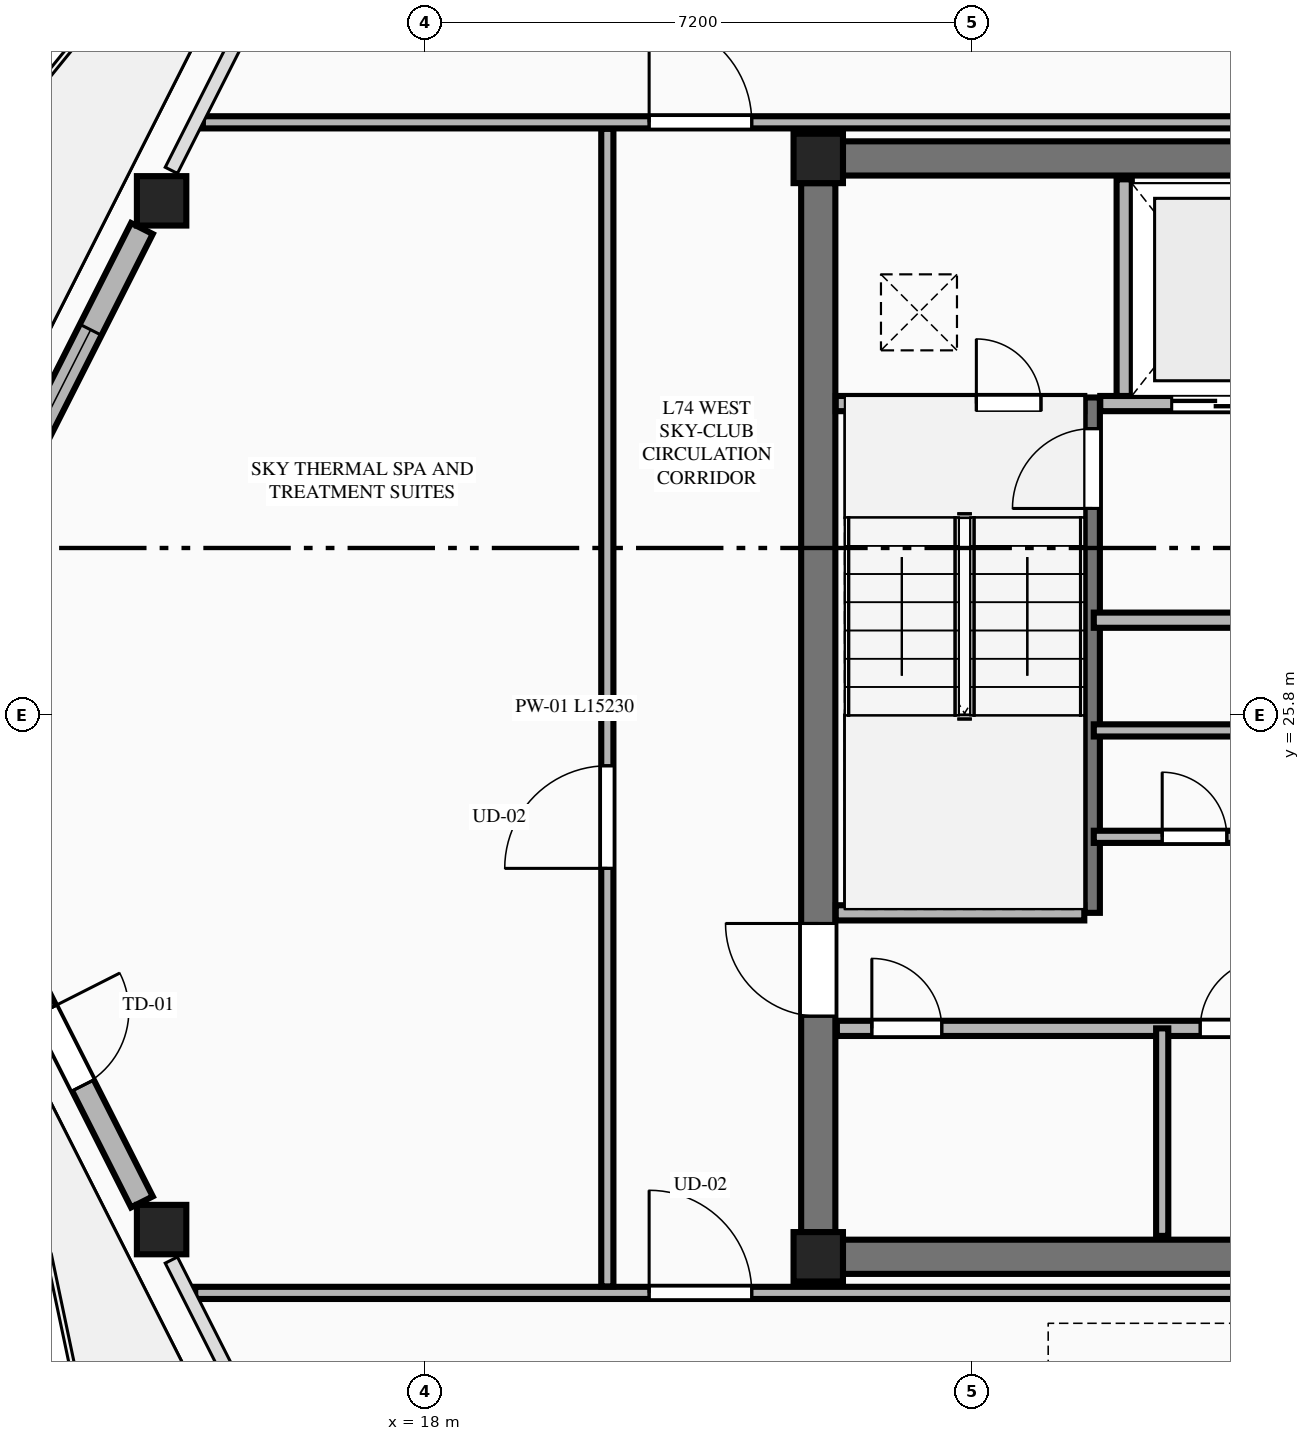
"""IFC4 building model, lengths in metres.
Left out: names, types, materials, properties, quantities, classifications, styles, units other than length and angle.
Written with IfcOpenShell. Run it as: python <this file> out.ifc"""

import sys

from ifc_helpers import new_model, si_unit, direction, frame, frame_2d, origin, origin_2d, place, context, subcontext, project, spatial, rectangle, extrude, element, fill, save


model = new_model("IFC4")
c1 = context("Model", 3, precision=1e-05, world=origin(), true_north=direction((0.0, 1.0)))
c2 = subcontext(c1, "Body", "Model", "MODEL_VIEW")
j1 = project(units=[si_unit("LENGTHUNIT", "METRE"), si_unit("PLANEANGLEUNIT", "RADIAN")], contexts=[c1])
p1 = place(None, origin())
s1 = spatial("IfcSite", under=j1, at=p1, CompositionType="ELEMENT")
p2 = place(p1, origin())
s2 = spatial("IfcBuilding", under=s1, at=p2, CompositionType="ELEMENT")
p3 = place(p2, frame((0.0, 0.0, 278.1)))
s3 = spatial("IfcBuildingStorey", under=s2, at=p3, CompositionType="ELEMENT", Elevation=278.1)
for number, where, z_axis, x_axis in (
    (1, (23.175, 18.675, 0.0), (0.0, 0.0, 1.0), (1.0, 0.0, 0.0)),
    (2, (23.175, 33.125, 0.0), (0.0, 0.0, 1.0), (1.0, 0.0, 0.0)),
):
    element("IfcColumn", number, at=place(p3, frame(where, z_axis=z_axis, x_axis=x_axis)), inside=s3, PredefinedType="COLUMN", context=c2, shape_type="SweptSolid", body=[
        extrude(rectangle(XDim=0.65, YDim=0.65, at=origin_2d()), origin(), (0.0, 0.0, 1.0), 5.4),
    ])
for number, where, z_axis, x_axis in (
    (3, (23.5, 18.675, 0.0), (0.0, 0.0, 1.0), (1.0, 0.0, 0.0)),
    (4, (23.5, 33.125, 0.0), (0.0, 0.0, 1.0), (1.0, 0.0, 0.0)),
):
    element("IfcWall", number, at=place(p3, frame(where, z_axis=z_axis, x_axis=x_axis)), inside=s3, PredefinedType="SHEAR", context=c2, shape_type="SweptSolid", body=[
        extrude(rectangle(XDim=17.8, YDim=0.45, at=frame_2d((8.9, 0.0))), origin(), (0.0, 0.0, 1.0), 5.2),
    ])
p4 = place(p3, frame((23.175, 19.0, 0.0), z_axis=(0.0, 0.0, 1.0), x_axis=(0.0, 1.0, 0.0)))
e5 = element("IfcWall", 5, at=p4, inside=s3, PredefinedType="SHEAR", context=c2, shape_type="SweptSolid", body=[
    extrude(rectangle(XDim=13.8, YDim=0.45, at=frame_2d((6.9, 0.0))), origin(), (0.0, 0.0, 1.0), 5.2),
])
p5 = place(p4, frame((2.84, 0.0, 0.0)))
e6 = element("IfcOpeningElement", 6, at=p5, cuts=e5, PredefinedType="OPENING", context=c2, shape_type="SweptSolid", body=[
    extrude(rectangle(XDim=1.22, YDim=2.25, at=frame_2d((0.61, 1.125))), frame((0.0, 0.235, 0.0), z_axis=(0.0, -1.0, 0.0), x_axis=(1.0, 0.0, 0.0)), (0.0, 0.0, 1.0), 0.47),
])
for number, where, z_axis, x_axis in (
    (7, (14.536, 32.567, 0.0), (0.0, 0.0, 1.0), (1.0, 0.0, 0.0)),
    (8, (14.536, 19.033, 0.0), (0.0, 0.0, 1.0), (1.0, 0.0, 0.0)),
):
    element("IfcColumn", number, at=place(p3, frame(where, z_axis=z_axis, x_axis=x_axis)), inside=s3, PredefinedType="COLUMN", context=c2, shape_type="SweptSolid", body=[
        extrude(rectangle(XDim=0.65, YDim=0.65, at=origin_2d()), origin(), (0.0, 0.0, 1.0), 5.4),
    ])
p6 = place(p3, frame((26.78, 23.2, 0.0), z_axis=(0.0, 0.0, 1.0), x_axis=(0.0, 1.0, 0.0)))
e9 = element("IfcWall", 9, at=p6, inside=s3, PredefinedType="SHEAR", context=c2, shape_type="SweptSolid", body=[
    extrude(rectangle(XDim=6.78, YDim=0.2, at=frame_2d((3.39, 0.0))), origin(), (0.0, 0.0, 1.0), 5.4),
])
p7 = place(p6, frame((5.32, 0.0, 0.0)))
e10 = element("IfcOpeningElement", 10, at=p7, cuts=e9, PredefinedType="OPENING", context=c2, shape_type="SweptSolid", body=[
    extrude(rectangle(XDim=1.05, YDim=2.15, at=frame_2d((0.525, 1.075))), frame((0.0, 0.11, 0.0), z_axis=(0.0, -1.0, 0.0), x_axis=(1.0, 0.0, 0.0)), (0.0, 0.0, 1.0), 0.22),
])
p8 = place(p3, frame((23.405, 23.2, 0.0), z_axis=(0.0, 0.0, 1.0), x_axis=(1.0, 0.0, 0.0)))
e11 = element("IfcWall", 11, at=p8, inside=s3, PredefinedType="PLUMBINGWALL", context=c2, shape_type="SweptSolid", body=[
    extrude(rectangle(XDim=3.27, YDim=0.2, at=frame_2d((1.635, 0.0))), origin(), (0.0, 0.0, 1.0), 5.2),
])
p9 = place(p3, frame((23.405, 29.9, 0.0), z_axis=(0.0, 0.0, 1.0), x_axis=(1.0, 0.0, 0.0)))
e12 = element("IfcWall", 12, at=p9, inside=s3, PredefinedType="PLUMBINGWALL", context=c2, shape_type="SweptSolid", body=[
    extrude(rectangle(XDim=3.27, YDim=0.2, at=frame_2d((1.635, 0.0))), origin(), (0.0, 0.0, 1.0), 5.2),
])
p10 = place(p9, frame((1.85, 0.0, 0.0)))
e13 = element("IfcOpeningElement", 13, at=p10, cuts=e12, PredefinedType="OPENING", context=c2, shape_type="SweptSolid", body=[
    extrude(rectangle(XDim=0.85, YDim=2.05, at=frame_2d((0.425, 1.025))), frame((0.0, 0.11, 0.0), z_axis=(0.0, -1.0, 0.0), x_axis=(1.0, 0.0, 0.0)), (0.0, 0.0, 1.0), 0.22),
])
p11 = place(p3, frame((26.885, 29.9, 0.0), z_axis=(0.0, 0.0, 1.0), x_axis=(1.0, 0.0, 0.0)))
e14 = element("IfcWall", 14, at=p11, inside=s3, PredefinedType="PLUMBINGWALL", context=c2, shape_type="SweptSolid", body=[
    extrude(rectangle(XDim=3.015, YDim=0.2, at=frame_2d((1.507, 0.0))), origin(), (0.0, 0.0, 1.0), 5.2),
])
p12 = place(p11, frame((0.94, 0.0, 0.0)))
e15 = element("IfcOpeningElement", 15, at=p12, cuts=e14, PredefinedType="OPENING", context=c2, shape_type="SweptSolid", body=[
    extrude(rectangle(XDim=1.15, YDim=2.2, at=frame_2d((0.575, 1.1))), frame((0.0, 0.11, 0.0), z_axis=(0.0, -1.0, 0.0), x_axis=(1.0, 0.0, 0.0)), (0.0, 0.0, 1.0), 0.22),
])
p13 = place(p3, frame((27.2, 30.0, 0.0), z_axis=(0.0, 0.0, 1.0), x_axis=(0.0, 1.0, 0.0)))
e16 = element("IfcWall", 16, at=p13, inside=s3, PredefinedType="PLUMBINGWALL", context=c2, shape_type="SweptSolid", body=[
    extrude(rectangle(XDim=2.85, YDim=0.2, at=frame_2d((1.425, 0.0))), origin(), (0.0, 0.0, 1.0), 5.2),
])
p14 = place(p3, frame((26.8, 27.05, 0.0), z_axis=(0.0, 0.0, 1.0), x_axis=(1.0, 0.0, 0.0)))
e17 = element("IfcWall", 17, at=p14, inside=s3, PredefinedType="PLUMBINGWALL", context=c2, shape_type="SweptSolid", body=[
    extrude(rectangle(XDim=3.2, YDim=0.2, at=frame_2d((1.6, 0.0))), origin(), (0.0, 0.0, 1.0), 5.2),
])
p15 = place(p3, frame((26.8, 24.2, 0.0), z_axis=(0.0, 0.0, 1.0), x_axis=(1.0, 0.0, 0.0)))
e18 = element("IfcWall", 18, at=p15, inside=s3, PredefinedType="PARTITIONING", context=c2, shape_type="SweptSolid", body=[
    extrude(rectangle(XDim=3.2, YDim=0.16, at=frame_2d((1.6, 0.0))), origin(), (0.0, 0.0, 1.0), 5.2),
])
p16 = place(p15, frame((0.9, 0.0, 0.0)))
e19 = element("IfcOpeningElement", 19, at=p16, cuts=e18, PredefinedType="OPENING", context=c2, shape_type="SweptSolid", body=[
    extrude(rectangle(XDim=0.85, YDim=2.05, at=frame_2d((0.425, 1.025))), frame((0.0, 0.09, 0.0), z_axis=(0.0, -1.0, 0.0), x_axis=(1.0, 0.0, 0.0)), (0.0, 0.0, 1.0), 0.18),
])
p17 = place(p3, frame((26.8, 25.6, 0.0), z_axis=(0.0, 0.0, 1.0), x_axis=(1.0, 0.0, 0.0)))
e20 = element("IfcWall", 20, at=p17, inside=s3, PredefinedType="PARTITIONING", context=c2, shape_type="SweptSolid", body=[
    extrude(rectangle(XDim=3.2, YDim=0.16, at=frame_2d((1.6, 0.0))), origin(), (0.0, 0.0, 1.0), 5.2),
])
p18 = place(p3, frame((23.42, 21.68, 0.0), z_axis=(0.0, 0.0, 1.0), x_axis=(1.0, 0.0, 0.0)))
e21 = element("IfcWall", 21, at=p18, inside=s3, PredefinedType="PLUMBINGWALL", context=c2, shape_type="SweptSolid", body=[
    extrude(rectangle(XDim=17.96, YDim=0.2, at=frame_2d((8.98, 0.0))), origin(), (0.0, 0.0, 1.0), 5.2),
])
p19 = place(p18, frame((0.46, 0.0, 0.0)))
e22 = element("IfcOpeningElement", 22, at=p19, cuts=e21, PredefinedType="OPENING", context=c2, shape_type="SweptSolid", body=[
    extrude(rectangle(XDim=0.92, YDim=2.15, at=frame_2d((0.46, 1.075))), frame((0.0, 0.11, 0.0), z_axis=(0.0, -1.0, 0.0), x_axis=(1.0, 0.0, 0.0)), (0.0, 0.0, 1.0), 0.22),
])
p20 = place(p18, frame((4.78, 0.0, 0.0)))
e23 = element("IfcOpeningElement", 23, at=p20, cuts=e21, PredefinedType="OPENING", context=c2, shape_type="SweptSolid", body=[
    extrude(rectangle(XDim=0.92, YDim=2.15, at=frame_2d((0.46, 1.075))), frame((0.0, 0.11, 0.0), z_axis=(0.0, -1.0, 0.0), x_axis=(1.0, 0.0, 0.0)), (0.0, 0.0, 1.0), 0.22),
])
p21 = place(p18, frame((9.48, 0.0, 0.0)))
e24 = element("IfcOpeningElement", 24, at=p21, cuts=e21, PredefinedType="OPENING", context=c2, shape_type="SweptSolid", body=[
    extrude(rectangle(XDim=0.92, YDim=2.15, at=frame_2d((0.46, 1.075))), frame((0.0, 0.11, 0.0), z_axis=(0.0, -1.0, 0.0), x_axis=(1.0, 0.0, 0.0)), (0.0, 0.0, 1.0), 0.22),
])
p22 = place(p18, frame((14.08, 0.0, 0.0)))
e25 = element("IfcOpeningElement", 25, at=p22, cuts=e21, PredefinedType="OPENING", context=c2, shape_type="SweptSolid", body=[
    extrude(rectangle(XDim=0.92, YDim=2.15, at=frame_2d((0.46, 1.075))), frame((0.0, 0.11, 0.0), z_axis=(0.0, -1.0, 0.0), x_axis=(1.0, 0.0, 0.0)), (0.0, 0.0, 1.0), 0.22),
])
p23 = place(p3, frame((27.7, 18.95, 0.0), z_axis=(0.0, 0.0, 1.0), x_axis=(0.0, 1.0, 0.0)))
e26 = element("IfcWall", 26, at=p23, inside=s3, PredefinedType="PARTITIONING", context=c2, shape_type="SweptSolid", body=[
    extrude(rectangle(XDim=2.73, YDim=0.16, at=frame_2d((1.365, 0.0))), origin(), (0.0, 0.0, 1.0), 5.2),
])
p24 = place(p3, frame((14.978, 18.2, 0.0), z_axis=(0.0, 0.0, 1.0), x_axis=(1.0, 0.0, 0.0)))
e27 = element("IfcWall", 27, at=p24, inside=s3, PredefinedType="PARTITIONING", context=c2, shape_type="SweptSolid", body=[
    extrude(rectangle(XDim=34.844, YDim=0.16, at=frame_2d((17.422, 0.0))), origin(), (0.0, 0.0, 1.0), 5.2),
])
p25 = place(p24, frame((5.972, 0.0, 0.0)))
e28 = element("IfcOpeningElement", 28, at=p25, cuts=e27, PredefinedType="OPENING", context=c2, shape_type="SweptSolid", body=[
    extrude(rectangle(XDim=1.35, YDim=2.35, at=frame_2d((0.675, 1.175))), frame((0.0, 0.09, 0.0), z_axis=(0.0, -1.0, 0.0), x_axis=(1.0, 0.0, 0.0)), (0.0, 0.0, 1.0), 0.18),
])
p26 = place(p24, frame((27.722, 0.0, 0.0)))
e29 = element("IfcOpeningElement", 29, at=p26, cuts=e27, PredefinedType="OPENING", context=c2, shape_type="SweptSolid", body=[
    extrude(rectangle(XDim=1.35, YDim=2.35, at=frame_2d((0.675, 1.175))), frame((0.0, 0.09, 0.0), z_axis=(0.0, -1.0, 0.0), x_axis=(1.0, 0.0, 0.0)), (0.0, 0.0, 1.0), 0.18),
])
p27 = place(p3, frame((20.4, 18.285, 0.0), z_axis=(0.0, 0.0, 1.0), x_axis=(0.0, 1.0, 0.0)))
e30 = element("IfcWall", 30, at=p27, inside=s3, PredefinedType="PARTITIONING", context=c2, shape_type="SweptSolid", body=[
    extrude(rectangle(XDim=15.23, YDim=0.16, at=frame_2d((7.615, 0.0))), origin(), (0.0, 0.0, 1.0), 4.887),
])
p28 = place(p27, frame((5.5, 0.0, 0.0)))
e31 = element("IfcOpeningElement", 31, at=p28, cuts=e30, PredefinedType="OPENING", context=c2, shape_type="SweptSolid", body=[
    extrude(rectangle(XDim=1.35, YDim=2.35, at=frame_2d((0.675, 1.175))), frame((0.0, 0.09, 0.0), z_axis=(0.0, -1.0, 0.0), x_axis=(1.0, 0.0, 0.0)), (0.0, 0.0, 1.0), 0.18),
])
p29 = place(p3, frame((15.079, 33.6, 0.0), z_axis=(0.0, 0.0, 1.0), x_axis=(1.0, 0.0, 0.0)))
e32 = element("IfcWall", 32, at=p29, inside=s3, PredefinedType="PARTITIONING", context=c2, shape_type="SweptSolid", body=[
    extrude(rectangle(XDim=34.642, YDim=0.16, at=frame_2d((17.321, 0.0))), origin(), (0.0, 0.0, 1.0), 5.2),
])
p30 = place(p29, frame((5.871, 0.0, 0.0)))
e33 = element("IfcOpeningElement", 33, at=p30, cuts=e32, PredefinedType="OPENING", context=c2, shape_type="SweptSolid", body=[
    extrude(rectangle(XDim=1.35, YDim=2.35, at=frame_2d((0.675, 1.175))), frame((0.0, 0.09, 0.0), z_axis=(0.0, -1.0, 0.0), x_axis=(1.0, 0.0, 0.0)), (0.0, 0.0, 1.0), 0.18),
])
p31 = place(p29, frame((27.271, 0.0, 0.0)))
e34 = element("IfcOpeningElement", 34, at=p31, cuts=e32, PredefinedType="OPENING", context=c2, shape_type="SweptSolid", body=[
    extrude(rectangle(XDim=1.35, YDim=2.35, at=frame_2d((0.675, 1.175))), frame((0.0, 0.09, 0.0), z_axis=(0.0, -1.0, 0.0), x_axis=(1.0, 0.0, 0.0)), (0.0, 0.0, 1.0), 0.18),
])
p32 = place(p3, frame((14.277, 32.203, 0.0), z_axis=(0.0, 0.0, 1.0), x_axis=(-0.451557557387, -0.892241992044, 0.0)))
e35 = element("IfcWall", 35, at=p32, inside=s3, PredefinedType="STANDARD", context=c2, shape_type="SweptSolid", body=[
    extrude(rectangle(XDim=4.536, YDim=0.32, at=frame_2d((2.268, 0.0))), origin(), (0.0, 0.0, 1.0), 4.39),
])
p33 = place(p32, frame((1.493, 0.0, 0.75)))
e36 = element("IfcOpeningElement", 36, at=p33, cuts=e35, PredefinedType="OPENING", context=c2, shape_type="SweptSolid", body=[
    extrude(rectangle(XDim=1.55, YDim=2.05, at=frame_2d((0.775, 1.025))), frame((0.0, 0.17, 0.0), z_axis=(0.0, -1.0, 0.0), x_axis=(1.0, 0.0, 0.0)), (0.0, 0.0, 1.0), 0.34),
])
p34 = place(p3, frame((12.229, 23.444, 0.0), z_axis=(0.0, 0.0, 1.0), x_axis=(0.451535871335, -0.892252966875, 0.0)))
e37 = element("IfcWall", 37, at=p34, inside=s3, PredefinedType="STANDARD", context=c2, shape_type="SweptSolid", body=[
    extrude(rectangle(XDim=4.536, YDim=0.32, at=frame_2d((2.268, 0.0))), origin(), (0.0, 0.0, 1.0), 4.39),
])
p35 = place(p34, frame((1.718, 0.0, 0.0)))
e38 = element("IfcOpeningElement", 38, at=p35, cuts=e37, PredefinedType="OPENING", context=c2, shape_type="SweptSolid", body=[
    extrude(rectangle(XDim=1.1, YDim=2.25, at=frame_2d((0.55, 1.125))), frame((0.0, 0.17, 0.0), z_axis=(0.0, -1.0, 0.0), x_axis=(1.0, 0.0, 0.0)), (0.0, 0.0, 1.0), 0.34),
])
p36 = place(p5, origin())
e39 = element("IfcDoor", 39, at=p36, inside=s3, OperationType="SINGLE_SWING_RIGHT", PredefinedType="DOOR", context=c2, shape_type="SweptSolid", body=[
    extrude(rectangle(XDim=1.22, YDim=2.25, at=frame_2d((0.61, 1.125))), frame((0.0, 0.025, 0.0), z_axis=(0.0, -1.0, 0.0), x_axis=(1.0, 0.0, 0.0)), (0.0, 0.0, 1.0), 0.05),
])
fill(e6, e39)
p37 = place(p7, origin())
e40 = element("IfcDoor", 40, at=p37, inside=s3, OperationType="SINGLE_SWING_LEFT", PredefinedType="DOOR", context=c2, shape_type="SweptSolid", body=[
    extrude(rectangle(XDim=1.05, YDim=2.15, at=frame_2d((0.525, 1.075))), frame((0.0, 0.025, 0.0), z_axis=(0.0, -1.0, 0.0), x_axis=(1.0, 0.0, 0.0)), (0.0, 0.0, 1.0), 0.05),
])
fill(e10, e40)
p38 = place(p10, origin())
e41 = element("IfcDoor", 41, at=p38, inside=s3, OperationType="SINGLE_SWING_LEFT", PredefinedType="DOOR", context=c2, shape_type="SweptSolid", body=[
    extrude(rectangle(XDim=0.85, YDim=2.05, at=frame_2d((0.425, 1.025))), frame((0.0, 0.025, 0.0), z_axis=(0.0, -1.0, 0.0), x_axis=(1.0, 0.0, 0.0)), (0.0, 0.0, 1.0), 0.05),
])
fill(e13, e41)
p39 = place(p12, origin())
e42 = element("IfcDoor", 42, at=p39, inside=s3, OperationType="DOUBLE_DOOR_SLIDING", PredefinedType="DOOR", context=c2, shape_type="SweptSolid", body=[
    extrude(rectangle(XDim=1.15, YDim=2.2, at=frame_2d((0.575, 1.1))), frame((0.0, 0.025, 0.0), z_axis=(0.0, -1.0, 0.0), x_axis=(1.0, 0.0, 0.0)), (0.0, 0.0, 1.0), 0.05),
])
fill(e15, e42)
p40 = place(p16, origin())
e43 = element("IfcDoor", 43, at=p40, inside=s3, OperationType="SINGLE_SWING_LEFT", PredefinedType="DOOR", context=c2, shape_type="SweptSolid", body=[
    extrude(rectangle(XDim=0.85, YDim=2.05, at=frame_2d((0.425, 1.025))), frame((0.0, 0.025, 0.0), z_axis=(0.0, -1.0, 0.0), x_axis=(1.0, 0.0, 0.0)), (0.0, 0.0, 1.0), 0.05),
])
fill(e19, e43)
p41 = place(p19, origin())
e44 = element("IfcDoor", 44, at=p41, inside=s3, OperationType="SINGLE_SWING_LEFT", PredefinedType="DOOR", context=c2, shape_type="SweptSolid", body=[
    extrude(rectangle(XDim=0.92, YDim=2.15, at=frame_2d((0.46, 1.075))), frame((0.0, 0.025, 0.0), z_axis=(0.0, -1.0, 0.0), x_axis=(1.0, 0.0, 0.0)), (0.0, 0.0, 1.0), 0.05),
])
fill(e22, e44)
p42 = place(p20, origin())
e45 = element("IfcDoor", 45, at=p42, inside=s3, OperationType="SINGLE_SWING_RIGHT", PredefinedType="DOOR", context=c2, shape_type="SweptSolid", body=[
    extrude(rectangle(XDim=0.92, YDim=2.15, at=frame_2d((0.46, 1.075))), frame((0.0, 0.025, 0.0), z_axis=(0.0, -1.0, 0.0), x_axis=(1.0, 0.0, 0.0)), (0.0, 0.0, 1.0), 0.05),
])
fill(e23, e45)
p43 = place(p25, origin())
e46 = element("IfcDoor", 46, at=p43, inside=s3, OperationType="SINGLE_SWING_LEFT", PredefinedType="DOOR", context=c2, shape_type="SweptSolid", body=[
    extrude(rectangle(XDim=1.35, YDim=2.35, at=frame_2d((0.675, 1.175))), frame((0.0, 0.025, 0.0), z_axis=(0.0, -1.0, 0.0), x_axis=(1.0, 0.0, 0.0)), (0.0, 0.0, 1.0), 0.05),
])
fill(e28, e46)
p44 = place(p28, origin())
e47 = element("IfcDoor", 47, at=p44, inside=s3, OperationType="SINGLE_SWING_LEFT", PredefinedType="DOOR", context=c2, shape_type="SweptSolid", body=[
    extrude(rectangle(XDim=1.35, YDim=2.35, at=frame_2d((0.675, 1.175))), frame((0.0, 0.025, 0.0), z_axis=(0.0, -1.0, 0.0), x_axis=(1.0, 0.0, 0.0)), (0.0, 0.0, 1.0), 0.05),
])
fill(e31, e47)
p45 = place(p30, origin())
e48 = element("IfcDoor", 48, at=p45, inside=s3, OperationType="SINGLE_SWING_LEFT", PredefinedType="DOOR", context=c2, shape_type="SweptSolid", body=[
    extrude(rectangle(XDim=1.35, YDim=2.35, at=frame_2d((0.675, 1.175))), frame((0.0, 0.025, 0.0), z_axis=(0.0, -1.0, 0.0), x_axis=(1.0, 0.0, 0.0)), (0.0, 0.0, 1.0), 0.05),
])
fill(e33, e48)
p46 = place(p33, origin())
e49 = element("IfcWindow", 49, at=p46, inside=s3, PartitioningType="SINGLE_PANEL", PredefinedType="WINDOW", context=c2, shape_type="SweptSolid", body=[
    extrude(rectangle(XDim=1.55, YDim=2.05, at=frame_2d((0.775, 1.025))), frame((0.0, 0.03, 0.0), z_axis=(0.0, -1.0, 0.0), x_axis=(1.0, 0.0, 0.0)), (0.0, 0.0, 1.0), 0.06),
])
fill(e36, e49)
p47 = place(p35, origin())
e50 = element("IfcDoor", 50, at=p47, inside=s3, OperationType="SINGLE_SWING_LEFT", PredefinedType="DOOR", context=c2, shape_type="SweptSolid", body=[
    extrude(rectangle(XDim=1.1, YDim=2.25, at=frame_2d((0.55, 1.125))), frame((0.0, 0.025, 0.0), z_axis=(0.0, -1.0, 0.0), x_axis=(1.0, 0.0, 0.0)), (0.0, 0.0, 1.0), 0.05),
])
fill(e38, e50)
save(model, sys.argv[1])
